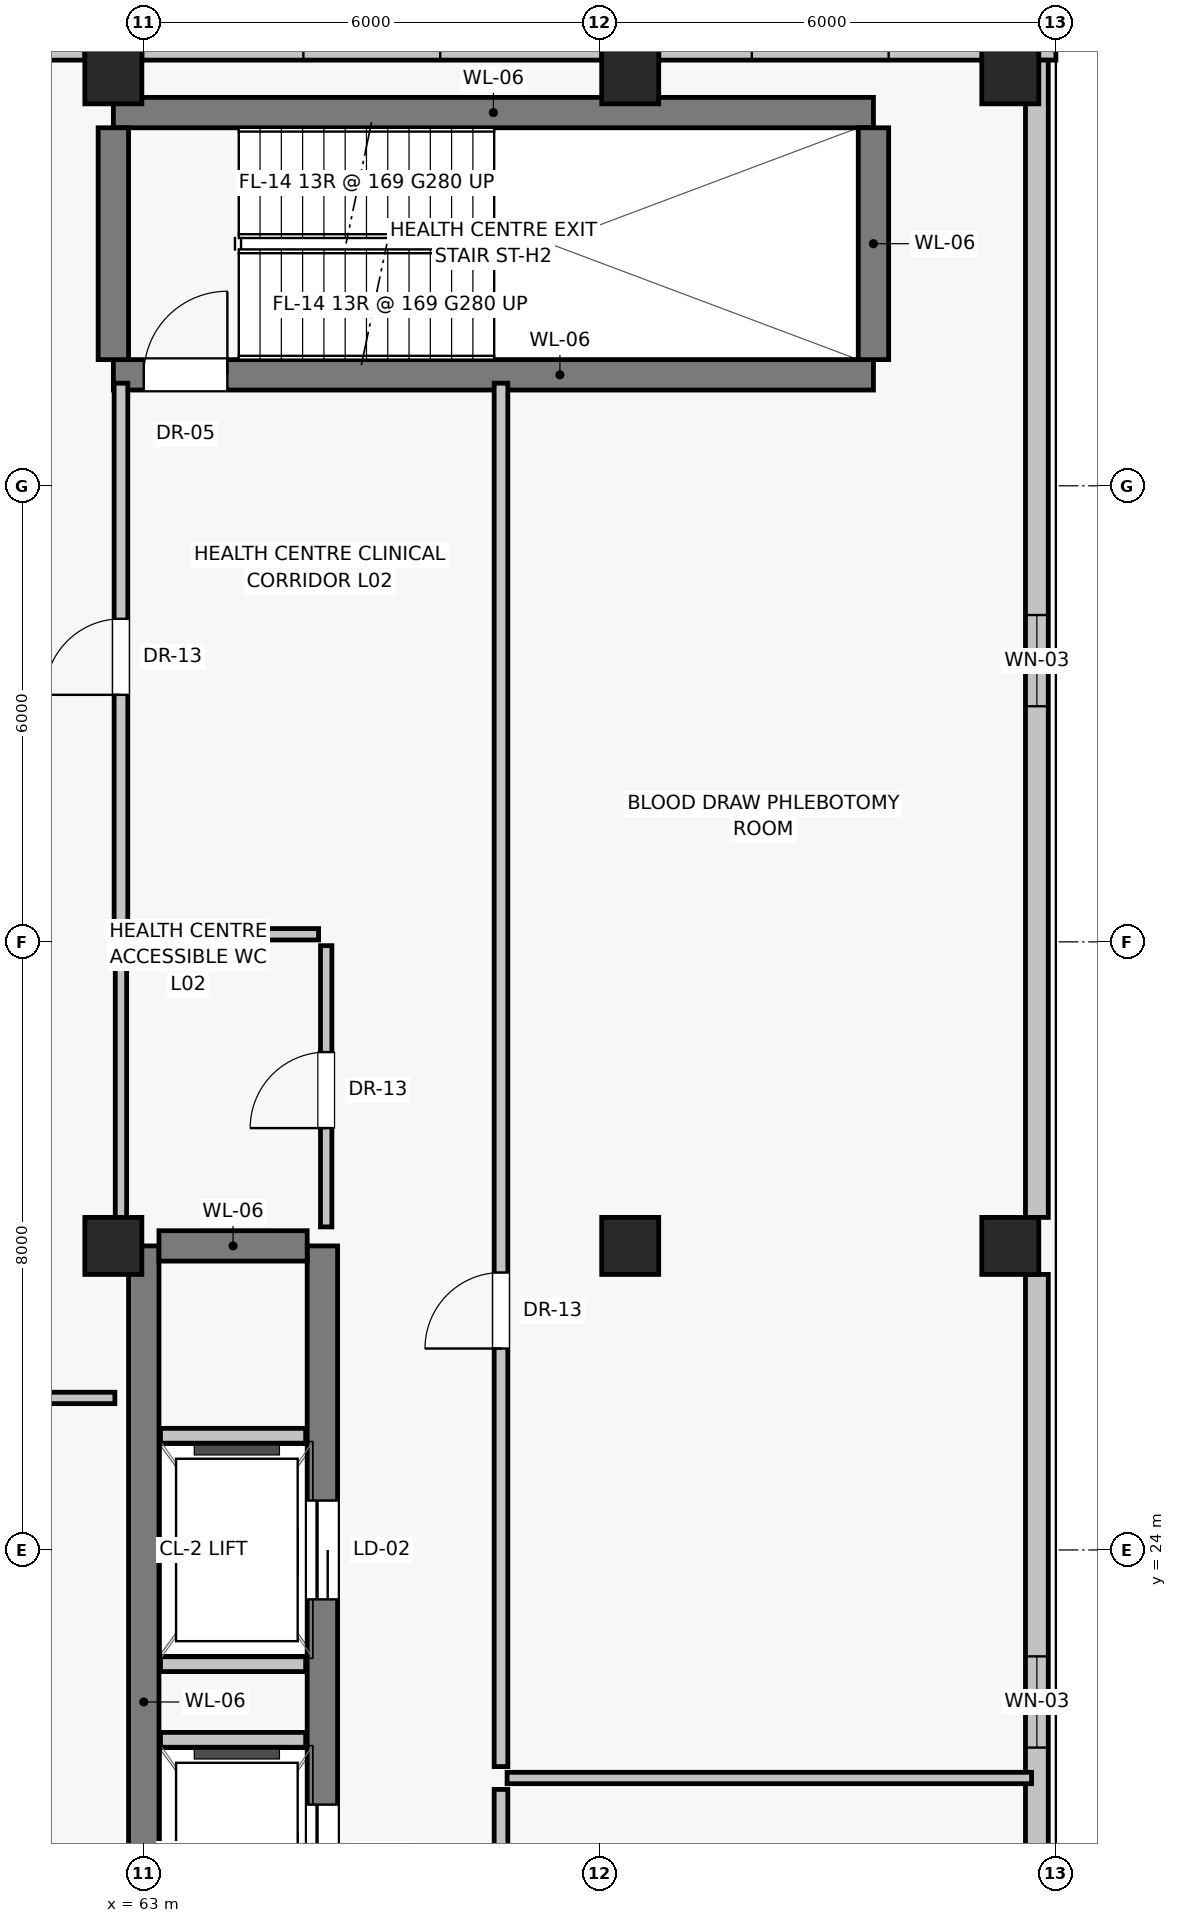
"""IFC4 building model, lengths in metres.
Left out: names, types, materials, properties, quantities, classifications, styles, units other than length and angle.
Written with IfcOpenShell. Run it as: python <this file> out.ifc"""

import sys

from ifc_helpers import new_model, si_unit, direction, frame, frame_2d, origin, origin_2d, place, context, subcontext, project, spatial, rectangle, extrude, source, transform, mapped, element, fill, save


model = new_model("IFC4")
c1 = context("Model", 3, precision=1e-05, world=origin(), true_north=direction((0.0, 1.0)))
c2 = subcontext(c1, "Body", "Model", "MODEL_VIEW")
j1 = project(units=[si_unit("LENGTHUNIT", "METRE"), si_unit("PLANEANGLEUNIT", "RADIAN")], contexts=[c1])
p1 = place(None, origin())
s1 = spatial("IfcSite", under=j1, at=p1, CompositionType="ELEMENT")
p2 = place(p1, origin())
s2 = spatial("IfcBuilding", under=s1, at=p2, CompositionType="ELEMENT")
p3 = place(p2, frame((0.0, 0.0, 9.6)))
s3 = spatial("IfcBuildingStorey", under=s2, at=p3, CompositionType="ELEMENT", Elevation=9.6)
for number, where, z_axis, x_axis in (
    (1, (62.6, 28.0, 0.0), (0.0, 0.0, 1.0), (1.0, 0.0, 0.0)),
    (2, (62.6, 43.4, 0.0), (0.0, 0.0, 1.0), (1.0, 0.0, 0.0)),
    (3, (69.4, 28.0, 0.0), (0.0, 0.0, 1.0), (1.0, 0.0, 0.0)),
    (4, (69.4, 43.4, 0.0), (0.0, 0.0, 1.0), (1.0, 0.0, 0.0)),
    (5, (74.4, 28.0, 0.0), (0.0, 0.0, 1.0), (1.0, 0.0, 0.0)),
    (6, (74.4, 43.4, 0.0), (0.0, 0.0, 1.0), (1.0, 0.0, 0.0)),
):
    element("IfcColumn", number, at=place(p3, frame(where, z_axis=z_axis, x_axis=x_axis)), inside=s3, PredefinedType="COLUMN", context=c2, shape_type="SweptSolid", body=[
        extrude(rectangle(XDim=0.75, YDim=0.75, at=origin_2d()), origin(), (0.0, 0.0, 1.0), 4.4),
    ])
p4 = place(p3, frame((75.0, 43.75, 0.0), z_axis=(0.0, 0.0, 1.0), x_axis=(-1.0, 0.0, 0.0)))
e7 = element("IfcWall", 7, at=p4, inside=s3, PredefinedType="SOLIDWALL", context=c2, shape_type="SweptSolid", body=[
    extrude(rectangle(XDim=5.225, YDim=0.3, at=frame_2d((2.613, 0.0))), origin(), (0.0, 0.0, 1.0), 3.35),
])
p5 = place(p4, frame((2.2, 0.0, 0.85)))
e8 = element("IfcOpeningElement", 8, at=p5, cuts=e7, PredefinedType="OPENING", context=c2, shape_type="SweptSolid", body=[
    extrude(rectangle(XDim=1.8, YDim=1.65, at=frame_2d((0.9, 0.825))), frame((0.0, 0.16, 0.0), z_axis=(0.0, -1.0, 0.0), x_axis=(1.0, 0.0, 0.0)), (0.0, 0.0, 1.0), 0.32),
])
p6 = place(p3, frame((69.025, 43.75, 0.0), z_axis=(0.0, 0.0, 1.0), x_axis=(-1.0, 0.0, 0.0)))
e9 = element("IfcWall", 9, at=p6, inside=s3, PredefinedType="SOLIDWALL", context=c2, shape_type="SweptSolid", body=[
    extrude(rectangle(XDim=6.05, YDim=0.3, at=frame_2d((3.025, 0.0))), origin(), (0.0, 0.0, 1.0), 3.35),
])
p7 = place(p6, frame((2.125, 0.0, 0.85)))
e10 = element("IfcOpeningElement", 10, at=p7, cuts=e9, PredefinedType="OPENING", context=c2, shape_type="SweptSolid", body=[
    extrude(rectangle(XDim=1.8, YDim=1.65, at=frame_2d((0.9, 0.825))), frame((0.0, 0.16, 0.0), z_axis=(0.0, -1.0, 0.0), x_axis=(1.0, 0.0, 0.0)), (0.0, 0.0, 1.0), 0.32),
])
p8 = place(p3, frame((62.225, 43.75, 0.0), z_axis=(0.0, 0.0, 1.0), x_axis=(-1.0, 0.0, 0.0)))
e11 = element("IfcWall", 11, at=p8, inside=s3, PredefinedType="SOLIDWALL", context=c2, shape_type="SweptSolid", body=[
    extrude(rectangle(XDim=5.225, YDim=0.3, at=frame_2d((2.613, 0.0))), origin(), (0.0, 0.0, 1.0), 3.35),
])
p9 = place(p8, frame((1.225, 0.0, 0.85)))
e12 = element("IfcOpeningElement", 12, at=p9, cuts=e11, PredefinedType="OPENING", context=c2, shape_type="SweptSolid", body=[
    extrude(rectangle(XDim=1.8, YDim=1.65, at=frame_2d((0.9, 0.825))), frame((0.0, 0.16, 0.0), z_axis=(0.0, -1.0, 0.0), x_axis=(1.0, 0.0, 0.0)), (0.0, 0.0, 1.0), 0.32),
])
p10 = place(p3, frame((74.75, 16.375, 0.0), z_axis=(0.0, 0.0, 1.0), x_axis=(0.0, 1.0, 0.0)))
e13 = element("IfcWall", 13, at=p10, inside=s3, PredefinedType="SOLIDWALL", context=c2, shape_type="SweptSolid", body=[
    extrude(rectangle(XDim=11.25, YDim=0.3, at=frame_2d((5.625, 0.0))), origin(), (0.0, 0.0, 1.0), 3.35),
])
p11 = place(p10, frame((5.025, 0.0, 0.95)))
e14 = element("IfcOpeningElement", 14, at=p11, cuts=e13, PredefinedType="OPENING", context=c2, shape_type="SweptSolid", body=[
    extrude(rectangle(XDim=1.2, YDim=1.5, at=frame_2d((0.6, 0.75))), frame((0.0, 0.16, 0.0), z_axis=(0.0, -1.0, 0.0), x_axis=(1.0, 0.0, 0.0)), (0.0, 0.0, 1.0), 0.32),
])
p12 = place(p3, frame((74.75, 28.375, 0.0), z_axis=(0.0, 0.0, 1.0), x_axis=(0.0, 1.0, 0.0)))
e15 = element("IfcWall", 15, at=p12, inside=s3, PredefinedType="SOLIDWALL", context=c2, shape_type="SweptSolid", body=[
    extrude(rectangle(XDim=15.225, YDim=0.3, at=frame_2d((7.613, 0.0))), origin(), (0.0, 0.0, 1.0), 3.35),
])
p13 = place(p12, frame((6.725, 0.0, 0.95)))
e16 = element("IfcOpeningElement", 16, at=p13, cuts=e15, PredefinedType="OPENING", context=c2, shape_type="SweptSolid", body=[
    extrude(rectangle(XDim=1.2, YDim=1.5, at=frame_2d((0.6, 0.75))), frame((0.0, 0.16, 0.0), z_axis=(0.0, -1.0, 0.0), x_axis=(1.0, 0.0, 0.0)), (0.0, 0.0, 1.0), 0.32),
])
p14 = place(p3, frame((63.0, 16.0, 0.0), z_axis=(0.0, 0.0, 1.0), x_axis=(0.0, 1.0, 0.0)))
e17 = element("IfcWall", 17, at=p14, inside=s3, PredefinedType="SHEAR", context=c2, shape_type="SweptSolid", body=[
    extrude(rectangle(XDim=12.0, YDim=0.4, at=frame_2d((6.0, 0.0))), origin(), (0.0, 0.0, 1.0), 4.1),
])
p15 = place(p3, frame((65.35, 16.0, 0.0), z_axis=(0.0, 0.0, 1.0), x_axis=(0.0, 1.0, 0.0)))
e18 = element("IfcWall", 18, at=p15, inside=s3, PredefinedType="SHEAR", context=c2, shape_type="SweptSolid", body=[
    extrude(rectangle(XDim=12.0, YDim=0.4, at=frame_2d((6.0, 0.0))), origin(), (0.0, 0.0, 1.0), 4.1),
])
p16 = place(p15, frame((3.35, 0.0, 0.0)))
e19 = element("IfcOpeningElement", 19, at=p16, cuts=e18, PredefinedType="OPENING", context=c2, shape_type="SweptSolid", body=[
    extrude(rectangle(XDim=1.3, YDim=2.25, at=frame_2d((0.65, 1.125))), frame((0.0, 0.21, 0.0), z_axis=(0.0, -1.0, 0.0), x_axis=(1.0, 0.0, 0.0)), (0.0, 0.0, 1.0), 0.42),
])
p17 = place(p15, frame((7.35, 0.0, 0.0)))
e20 = element("IfcOpeningElement", 20, at=p17, cuts=e18, PredefinedType="OPENING", context=c2, shape_type="SweptSolid", body=[
    extrude(rectangle(XDim=1.3, YDim=2.25, at=frame_2d((0.65, 1.125))), frame((0.0, 0.21, 0.0), z_axis=(0.0, -1.0, 0.0), x_axis=(1.0, 0.0, 0.0)), (0.0, 0.0, 1.0), 0.42),
])
p18 = place(p3, frame((63.2, 28.0, 0.0), z_axis=(0.0, 0.0, 1.0), x_axis=(1.0, 0.0, 0.0)))
e21 = element("IfcWall", 21, at=p18, inside=s3, PredefinedType="SHEAR", context=c2, shape_type="SweptSolid", body=[
    extrude(rectangle(XDim=1.95, YDim=0.4, at=frame_2d((0.975, 0.0))), origin(), (0.0, 0.0, 1.0), 4.1),
])
for number, where, z_axis, x_axis in (
    (22, (63.22, 21.5, 0.0), (0.0, 0.0, 1.0), (1.0, 0.0, 0.0)),
    (23, (63.22, 22.5, 0.0), (0.0, 0.0, 1.0), (1.0, 0.0, 0.0)),
    (24, (63.22, 25.5, 0.0), (0.0, 0.0, 1.0), (1.0, 0.0, 0.0)),
):
    element("IfcWall", number, at=place(p3, frame(where, z_axis=z_axis, x_axis=x_axis)), inside=s3, PredefinedType="SOLIDWALL", context=c2, shape_type="SweptSolid", body=[
        extrude(rectangle(XDim=1.91, YDim=0.2, at=frame_2d((0.955, 0.0))), origin(), (0.0, 0.0, 1.0), 4.1),
    ])
p19 = place(p3, frame((62.6, 39.46, 0.0), z_axis=(0.0, 0.0, 1.0), x_axis=(1.0, 0.0, 0.0)))
e25 = element("IfcWall", 25, at=p19, inside=s3, PredefinedType="SHEAR", context=c2, shape_type="SweptSolid", body=[
    extrude(rectangle(XDim=10.0, YDim=0.4, at=frame_2d((5.0, 0.0))), origin(), (0.0, 0.0, 1.0), 4.1),
])
p20 = place(p19, frame((0.4, 0.0, 0.0)))
e26 = element("IfcOpeningElement", 26, at=p20, cuts=e25, PredefinedType="OPENING", context=c2, shape_type="SweptSolid", body=[
    extrude(rectangle(XDim=1.1, YDim=2.03, at=frame_2d((0.55, 1.015))), frame((0.0, 0.21, 0.0), z_axis=(0.0, -1.0, 0.0), x_axis=(1.0, 0.0, 0.0)), (0.0, 0.0, 1.0), 0.42),
])
p21 = place(p3, frame((62.6, 42.91, 0.0), z_axis=(0.0, 0.0, 1.0), x_axis=(1.0, 0.0, 0.0)))
e27 = element("IfcWall", 27, at=p21, inside=s3, PredefinedType="SHEAR", context=c2, shape_type="SweptSolid", body=[
    extrude(rectangle(XDim=10.0, YDim=0.4, at=frame_2d((5.0, 0.0))), origin(), (0.0, 0.0, 1.0), 4.1),
])
for number, where, z_axis, x_axis in (
    (28, (62.6, 39.66, 0.0), (0.0, 0.0, 1.0), (0.0, 1.0, 0.0)),
    (29, (72.6, 39.66, 0.0), (0.0, 0.0, 1.0), (0.0, 1.0, 0.0)),
):
    element("IfcWall", number, at=place(p3, frame(where, z_axis=z_axis, x_axis=x_axis)), inside=s3, PredefinedType="SHEAR", context=c2, shape_type="SweptSolid", body=[
        extrude(rectangle(XDim=3.05, YDim=0.4, at=frame_2d((1.525, 0.0))), origin(), (0.0, 0.0, 1.0), 4.1),
    ])
p22 = place(p3, frame((62.8, 32.1, 0.0), z_axis=(0.0, 0.0, 1.0), x_axis=(1.0, 0.0, 0.0)))
e30 = element("IfcWall", 30, at=p22, inside=s3, PredefinedType="PARTITIONING", context=c2, shape_type="SweptSolid", body=[
    extrude(rectangle(XDim=2.5, YDim=0.15, at=frame_2d((1.25, 0.0))), origin(), (0.0, 0.0, 1.0), 4.1),
])
p23 = place(p3, frame((62.7, 28.2, 0.0), z_axis=(0.0, 0.0, 1.0), x_axis=(0.0, 1.0, 0.0)))
e31 = element("IfcWall", 31, at=p23, inside=s3, PredefinedType="PARTITIONING", context=c2, shape_type="SweptSolid", body=[
    extrude(rectangle(XDim=3.8, YDim=0.15, at=frame_2d((1.9, 0.0))), origin(), (0.0, 0.0, 1.0), 3.5),
])
p24 = place(p3, frame((65.4, 28.25, 0.0), z_axis=(0.0, 0.0, 1.0), x_axis=(0.0, 1.0, 0.0)))
e32 = element("IfcWall", 32, at=p24, inside=s3, PredefinedType="PARTITIONING", context=c2, shape_type="SweptSolid", body=[
    extrude(rectangle(XDim=3.7, YDim=0.15, at=frame_2d((1.85, 0.0))), origin(), (0.0, 0.0, 1.0), 4.1),
])
p25 = place(p24, frame((1.3, 0.0, 0.0)))
e33 = element("IfcOpeningElement", 33, at=p25, cuts=e32, PredefinedType="OPENING", context=c2, shape_type="SweptSolid", body=[
    extrude(rectangle(XDim=1.0, YDim=2.01, at=frame_2d((0.5, 1.005))), frame((0.0, 0.085, 0.0), z_axis=(0.0, -1.0, 0.0), x_axis=(1.0, 0.0, 0.0)), (0.0, 0.0, 1.0), 0.17),
])
p26 = place(p3, frame((62.7, 32.25, 0.0), z_axis=(0.0, 0.0, 1.0), x_axis=(0.0, 1.0, 0.0)))
e34 = element("IfcWall", 34, at=p26, inside=s3, PredefinedType="PARTITIONING", context=c2, shape_type="SweptSolid", body=[
    extrude(rectangle(XDim=7.1, YDim=0.18, at=frame_2d((3.55, 0.0))), origin(), (0.0, 0.0, 1.0), 3.5),
])
p27 = place(p26, frame((3.0, 0.0, 0.0)))
e35 = element("IfcOpeningElement", 35, at=p27, cuts=e34, PredefinedType="OPENING", context=c2, shape_type="SweptSolid", body=[
    extrude(rectangle(XDim=1.0, YDim=2.01, at=frame_2d((0.5, 1.005))), frame((0.0, 0.1, 0.0), z_axis=(0.0, -1.0, 0.0), x_axis=(1.0, 0.0, 0.0)), (0.0, 0.0, 1.0), 0.2),
])
p28 = place(p3, frame((57.32, 26.0, 0.0), z_axis=(0.0, 0.0, 1.0), x_axis=(1.0, 0.0, 0.0)))
e36 = element("IfcWall", 36, at=p28, inside=s3, PredefinedType="PARTITIONING", context=c2, shape_type="SweptSolid", body=[
    extrude(rectangle(XDim=5.3, YDim=0.15, at=frame_2d((2.65, 0.0))), origin(), (0.0, 0.0, 1.0), 4.1),
])
p29 = place(p3, frame((67.7, 8.65, 0.0), z_axis=(0.0, 0.0, 1.0), x_axis=(0.0, 1.0, 0.0)))
e37 = element("IfcWall", 37, at=p29, inside=s3, PredefinedType="PARTITIONING", context=c2, shape_type="SweptSolid", body=[
    extrude(rectangle(XDim=12.2, YDim=0.18, at=frame_2d((6.1, 0.0))), origin(), (0.0, 0.0, 1.0), 4.1),
])
p30 = place(p29, frame((5.5, 0.0, 0.0)))
e38 = element("IfcOpeningElement", 38, at=p30, cuts=e37, PredefinedType="OPENING", context=c2, shape_type="SweptSolid", body=[
    extrude(rectangle(XDim=1.0, YDim=2.01, at=frame_2d((0.5, 1.005))), frame((0.0, 0.1, 0.0), z_axis=(0.0, -1.0, 0.0), x_axis=(1.0, 0.0, 0.0)), (0.0, 0.0, 1.0), 0.2),
])
p31 = place(p3, frame((67.7, 21.15, 0.0), z_axis=(0.0, 0.0, 1.0), x_axis=(0.0, 1.0, 0.0)))
e39 = element("IfcWall", 39, at=p31, inside=s3, PredefinedType="PARTITIONING", context=c2, shape_type="SweptSolid", body=[
    extrude(rectangle(XDim=18.2, YDim=0.18, at=frame_2d((9.1, 0.0))), origin(), (0.0, 0.0, 1.0), 4.1),
])
p32 = place(p31, frame((5.5, 0.0, 0.0)))
e40 = element("IfcOpeningElement", 40, at=p32, cuts=e39, PredefinedType="OPENING", context=c2, shape_type="SweptSolid", body=[
    extrude(rectangle(XDim=1.0, YDim=2.01, at=frame_2d((0.5, 1.005))), frame((0.0, 0.1, 0.0), z_axis=(0.0, -1.0, 0.0), x_axis=(1.0, 0.0, 0.0)), (0.0, 0.0, 1.0), 0.2),
])
p33 = place(p3, frame((67.78, 21.0, 0.0), z_axis=(0.0, 0.0, 1.0), x_axis=(1.0, 0.0, 0.0)))
e41 = element("IfcWall", 41, at=p33, inside=s3, PredefinedType="PARTITIONING", context=c2, shape_type="SweptSolid", body=[
    extrude(rectangle(XDim=6.9, YDim=0.15, at=frame_2d((3.45, 0.0))), origin(), (0.0, 0.0, 1.0), 4.1),
])
m1 = source(origin(), c2, "Body", "SweptSolid", [
    extrude(rectangle(XDim=1.2, YDim=1.5, at=frame_2d((0.6, 0.75))), frame((0.0, 0.03, 0.0), z_axis=(0.0, -1.0, 0.0), x_axis=(1.0, 0.0, 0.0)), (0.0, 0.0, 1.0), 0.06),
])
p34 = place(p11, origin())
e42 = element("IfcWindow", 42, at=p34, inside=s3, PartitioningType="SINGLE_PANEL", PredefinedType="WINDOW", context=c2, shape_type="MappedRepresentation", body=[
    mapped(m1, transform((0.0, 0.0, 0.0), scale=1.0)),
])
fill(e14, e42)
p35 = place(p13, origin())
e43 = element("IfcWindow", 43, at=p35, inside=s3, PartitioningType="SINGLE_PANEL", PredefinedType="WINDOW", context=c2, shape_type="MappedRepresentation", body=[
    mapped(m1, transform((0.0, 0.0, 0.0), scale=1.0)),
])
fill(e16, e43)
m2 = source(origin(), c2, "Body", "SweptSolid", [
    extrude(rectangle(XDim=1.3, YDim=2.25, at=frame_2d((0.65, 1.125))), frame((0.0, 0.025, 0.0), z_axis=(0.0, -1.0, 0.0), x_axis=(1.0, 0.0, 0.0)), (0.0, 0.0, 1.0), 0.05),
])
p36 = place(p16, origin())
e44 = element("IfcDoor", 44, at=p36, inside=s3, OperationType="SLIDING_TO_LEFT", PredefinedType="DOOR", context=c2, shape_type="MappedRepresentation", body=[
    mapped(m2, transform((0.0, 0.0, 0.0), scale=1.0)),
])
fill(e19, e44)
p37 = place(p17, origin())
e45 = element("IfcDoor", 45, at=p37, inside=s3, OperationType="SLIDING_TO_LEFT", PredefinedType="DOOR", context=c2, shape_type="MappedRepresentation", body=[
    mapped(m2, transform((0.0, 0.0, 0.0), scale=1.0)),
])
fill(e20, e45)
m3 = source(origin(), c2, "Body", "SweptSolid", [
    extrude(rectangle(XDim=1.1, YDim=2.03, at=frame_2d((0.55, 1.015))), frame((0.0, 0.025, 0.0), z_axis=(0.0, -1.0, 0.0), x_axis=(1.0, 0.0, 0.0)), (0.0, 0.0, 1.0), 0.05),
])
p38 = place(p20, origin())
e46 = element("IfcDoor", 46, at=p38, inside=s3, OperationType="SINGLE_SWING_RIGHT", PredefinedType="DOOR", context=c2, shape_type="MappedRepresentation", body=[
    mapped(m3, transform((0.0, 0.0, 0.0), scale=1.0)),
])
fill(e26, e46)
m4 = source(origin(), c2, "Body", "SweptSolid", [
    extrude(rectangle(XDim=1.0, YDim=2.01, at=frame_2d((0.5, 1.005))), frame((0.0, 0.025, 0.0), z_axis=(0.0, -1.0, 0.0), x_axis=(1.0, 0.0, 0.0)), (0.0, 0.0, 1.0), 0.05),
])
p39 = place(p25, origin())
e47 = element("IfcDoor", 47, at=p39, inside=s3, OperationType="SINGLE_SWING_LEFT", PredefinedType="DOOR", context=c2, shape_type="MappedRepresentation", body=[
    mapped(m4, transform((0.0, 0.0, 0.0), scale=1.0)),
])
fill(e33, e47)
p40 = place(p27, origin())
e48 = element("IfcDoor", 48, at=p40, inside=s3, OperationType="SINGLE_SWING_LEFT", PredefinedType="DOOR", context=c2, shape_type="MappedRepresentation", body=[
    mapped(m4, transform((0.0, 0.0, 0.0), scale=1.0)),
])
fill(e35, e48)
p41 = place(p32, origin())
e49 = element("IfcDoor", 49, at=p41, inside=s3, OperationType="SINGLE_SWING_LEFT", PredefinedType="DOOR", context=c2, shape_type="MappedRepresentation", body=[
    mapped(m4, transform((0.0, 0.0, 0.0), scale=1.0)),
])
fill(e40, e49)
save(model, sys.argv[1])
